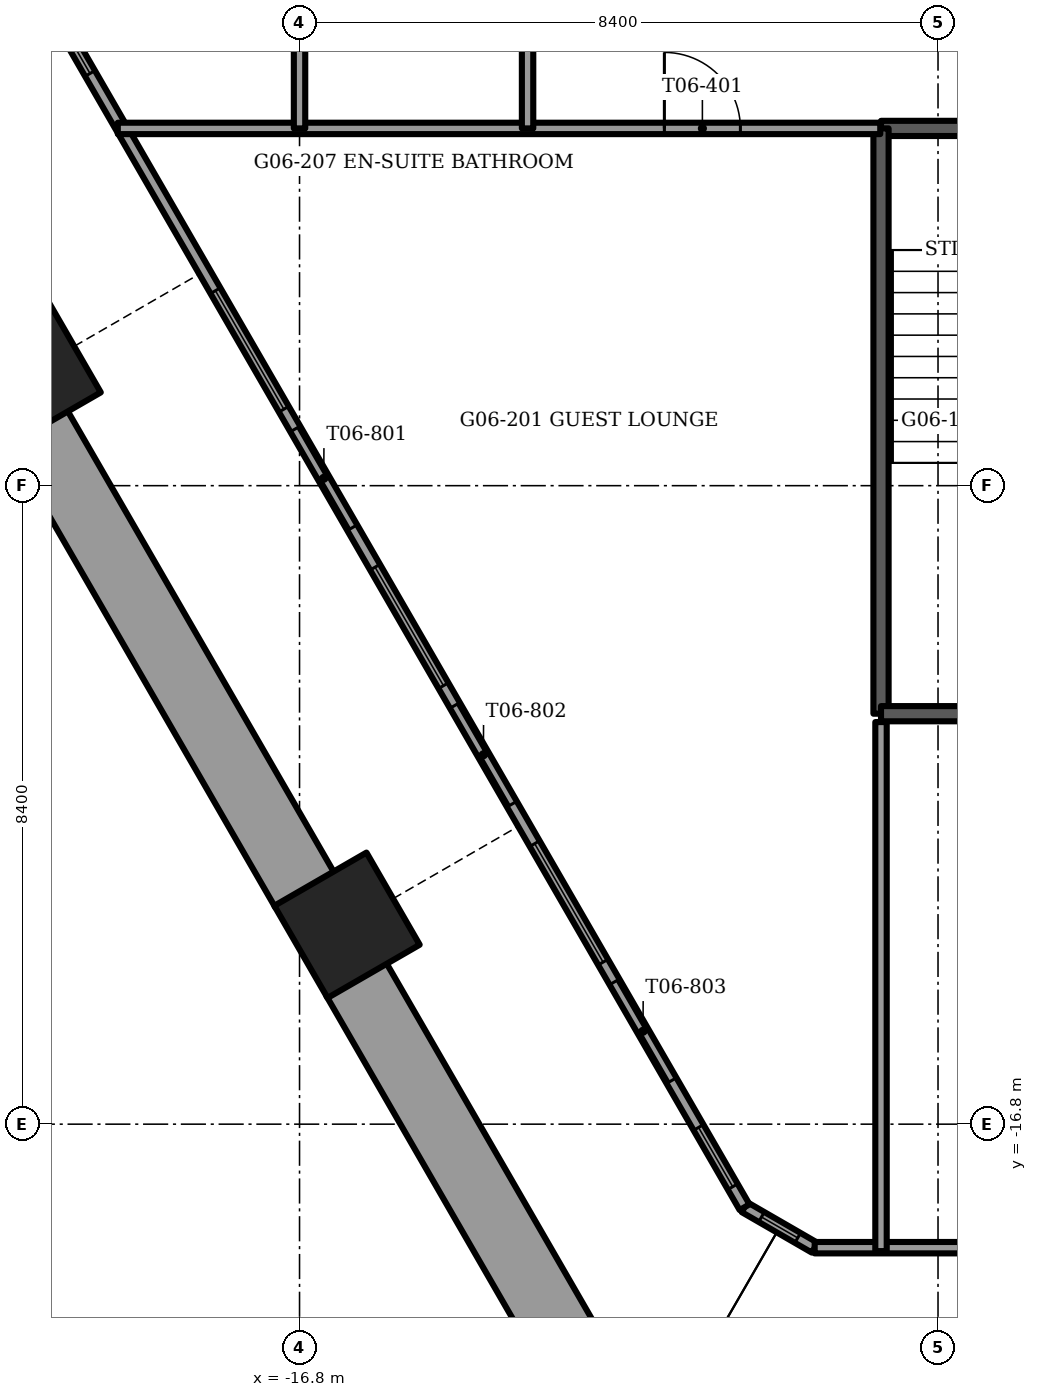
"""IFC4 building model, lengths in metres.
Left out: names, types, materials, properties, quantities, classifications, styles, units other than length and angle.
Written with IfcOpenShell. Run it as: python <this file> out.ifc"""

import sys

from ifc_helpers import new_model, si_unit, direction, frame, frame_2d, origin, origin_2d, place, context, subcontext, project, spatial, rectangle, extrude, element, fill, save


model = new_model("IFC4")
c1 = context("Model", 3, precision=1e-05, world=origin(), true_north=direction((0.0, 1.0)))
c2 = subcontext(c1, "Body", "Model", "MODEL_VIEW")
j1 = project(units=[si_unit("LENGTHUNIT", "METRE"), si_unit("PLANEANGLEUNIT", "RADIAN")], contexts=[c1])
p1 = place(None, origin())
s1 = spatial("IfcSite", under=j1, at=p1, CompositionType="ELEMENT")
p2 = place(p1, origin())
s2 = spatial("IfcBuilding", under=s1, at=p2, CompositionType="ELEMENT")
p3 = place(p2, frame((0.0, 0.0, 28.0)))
s3 = spatial("IfcBuildingStorey", under=s2, at=p3, CompositionType="ELEMENT", Elevation=28.0)
for number, where, z_axis, x_axis in (
    (1, (-20.371, -6.917, -1.2), (0.0, 0.0, 1.0), (-0.5, 0.866, 0.0)),
    (2, (-16.175, -14.183, -1.2), (0.0, 0.0, 1.0), (-0.5, 0.866, 0.0)),
):
    element("IfcColumn", number, at=place(p3, frame(where, z_axis=z_axis, x_axis=x_axis)), inside=s3, PredefinedType="COLUMN", context=c2, shape_type="SweptSolid", body=[
        extrude(rectangle(XDim=1.4, YDim=1.4, at=origin_2d()), origin(), (0.0, 0.0, 1.0), 3.75),
    ])
p4 = place(p3, frame((-20.252, -7.622, 0.0), z_axis=(0.0, 0.0, 1.0), x_axis=(0.499997206141, -0.866027016814, 0.0)))
e3 = element("IfcWall", 3, at=p4, inside=s3, PredefinedType="PARAPET", context=c2, shape_type="SweptSolid", body=[
    extrude(rectangle(XDim=7.051, YDim=0.9, at=frame_2d((3.525, 0.0))), origin(), (0.0, 0.0, 1.0), 1.1),
])
p5 = place(p3, frame((-16.057, -14.889, 0.0), z_axis=(0.0, 0.0, 1.0), x_axis=(0.500005133765, -0.866022439784, 0.0)))
e4 = element("IfcWall", 4, at=p5, inside=s3, PredefinedType="PARAPET", context=c2, shape_type="SweptSolid", body=[
    extrude(rectangle(XDim=6.704, YDim=0.9, at=frame_2d((3.352, 0.0))), origin(), (0.0, 0.0, 1.0), 1.1),
])
p6 = place(p3, frame((-20.968, -0.532, 0.0), z_axis=(0.0, 0.0, 1.0), x_axis=(0.500003237297, -0.866023534722, 0.0)))
e5 = element("IfcWall", 5, at=p6, inside=s3, PredefinedType="SOLIDWALL", context=c2, shape_type="SweptSolid", body=[
    extrude(rectangle(XDim=20.046, YDim=0.15, at=frame_2d((10.023, 0.0))), origin(), (0.0, 0.0, 1.0), 3.45),
])
p7 = place(p6, frame((1.923, 0.0, 0.15)))
e6 = element("IfcOpeningElement", 6, at=p7, cuts=e5, PredefinedType="OPENING", context=c2, shape_type="SweptSolid", body=[
    extrude(rectangle(XDim=0.9, YDim=2.85, at=frame_2d((0.45, 1.425))), frame((0.0, 0.075, 0.0), z_axis=(0.0, -1.0, 0.0), x_axis=(1.0, 0.0, 0.0)), (0.0, 0.0, 1.0), 0.15),
])
p8 = place(p6, frame((6.123, 0.0, 0.15)))
e7 = element("IfcOpeningElement", 7, at=p8, cuts=e5, PredefinedType="OPENING", context=c2, shape_type="SweptSolid", body=[
    extrude(rectangle(XDim=1.8, YDim=2.85, at=frame_2d((0.9, 1.425))), frame((0.0, 0.075, 0.0), z_axis=(0.0, -1.0, 0.0), x_axis=(1.0, 0.0, 0.0)), (0.0, 0.0, 1.0), 0.15),
])
p9 = place(p6, frame((8.223, 0.0, 0.0)))
e8 = element("IfcOpeningElement", 8, at=p9, cuts=e5, PredefinedType="OPENING", context=c2, shape_type="SweptSolid", body=[
    extrude(rectangle(XDim=1.5, YDim=2.4, at=frame_2d((0.75, 1.2))), frame((0.0, 0.075, 0.0), z_axis=(0.0, -1.0, 0.0), x_axis=(1.0, 0.0, 0.0)), (0.0, 0.0, 1.0), 0.15),
])
p10 = place(p6, frame((10.323, 0.0, 0.15)))
e9 = element("IfcOpeningElement", 9, at=p10, cuts=e5, PredefinedType="OPENING", context=c2, shape_type="SweptSolid", body=[
    extrude(rectangle(XDim=1.8, YDim=2.85, at=frame_2d((0.9, 1.425))), frame((0.0, 0.075, 0.0), z_axis=(0.0, -1.0, 0.0), x_axis=(1.0, 0.0, 0.0)), (0.0, 0.0, 1.0), 0.15),
])
p11 = place(p6, frame((12.423, 0.0, 0.0)))
e10 = element("IfcOpeningElement", 10, at=p11, cuts=e5, PredefinedType="OPENING", context=c2, shape_type="SweptSolid", body=[
    extrude(rectangle(XDim=1.5, YDim=2.4, at=frame_2d((0.75, 1.2))), frame((0.0, 0.075, 0.0), z_axis=(0.0, -1.0, 0.0), x_axis=(1.0, 0.0, 0.0)), (0.0, 0.0, 1.0), 0.15),
])
p12 = place(p6, frame((14.523, 0.0, 0.15)))
e11 = element("IfcOpeningElement", 11, at=p12, cuts=e5, PredefinedType="OPENING", context=c2, shape_type="SweptSolid", body=[
    extrude(rectangle(XDim=1.8, YDim=2.85, at=frame_2d((0.9, 1.425))), frame((0.0, 0.075, 0.0), z_axis=(0.0, -1.0, 0.0), x_axis=(1.0, 0.0, 0.0)), (0.0, 0.0, 1.0), 0.15),
])
p13 = place(p6, frame((16.623, 0.0, 0.0)))
e12 = element("IfcOpeningElement", 12, at=p13, cuts=e5, PredefinedType="OPENING", context=c2, shape_type="SweptSolid", body=[
    extrude(rectangle(XDim=1.5, YDim=2.4, at=frame_2d((0.75, 1.2))), frame((0.0, 0.075, 0.0), z_axis=(0.0, -1.0, 0.0), x_axis=(1.0, 0.0, 0.0)), (0.0, 0.0, 1.0), 0.15),
])
p14 = place(p6, frame((0.311, 0.0, 0.15)))
e13 = element("IfcOpeningElement", 13, at=p14, cuts=e5, PredefinedType="OPENING", context=c2, shape_type="SweptSolid", body=[
    extrude(rectangle(XDim=0.9, YDim=2.73, at=frame_2d((0.45, 1.365))), frame((0.0, 0.075, 0.0), z_axis=(0.0, -1.0, 0.0), x_axis=(1.0, 0.0, 0.0)), (0.0, 0.0, 1.0), 0.15),
])
p15 = place(p6, frame((18.834, 0.0, 0.15)))
e14 = element("IfcOpeningElement", 14, at=p15, cuts=e5, PredefinedType="OPENING", context=c2, shape_type="SweptSolid", body=[
    extrude(rectangle(XDim=0.9, YDim=2.73, at=frame_2d((0.45, 1.365))), frame((0.0, 0.075, 0.0), z_axis=(0.0, -1.0, 0.0), x_axis=(1.0, 0.0, 0.0)), (0.0, 0.0, 1.0), 0.15),
])
p16 = place(p3, frame((-10.023, -18.425, 0.0), z_axis=(0.0, 0.0, 1.0), x_axis=(1.0, 0.0, 0.0)))
e15 = element("IfcWall", 15, at=p16, inside=s3, PredefinedType="SOLIDWALL", context=c2, shape_type="SweptSolid", body=[
    extrude(rectangle(XDim=20.045, YDim=0.15, at=frame_2d((10.023, 0.0))), origin(), (0.0, 0.0, 1.0), 3.45),
])
p17 = place(p16, frame((4.573, 0.0, 0.15)))
e16 = element("IfcOpeningElement", 16, at=p17, cuts=e15, PredefinedType="OPENING", context=c2, shape_type="SweptSolid", body=[
    extrude(rectangle(XDim=0.9, YDim=2.85, at=frame_2d((0.45, 1.425))), frame((0.0, 0.075, 0.0), z_axis=(0.0, -1.0, 0.0), x_axis=(1.0, 0.0, 0.0)), (0.0, 0.0, 1.0), 0.15),
])
p18 = place(p16, frame((2.373, 0.0, 0.15)))
e17 = element("IfcOpeningElement", 17, at=p18, cuts=e15, PredefinedType="OPENING", context=c2, shape_type="SweptSolid", body=[
    extrude(rectangle(XDim=1.5, YDim=2.85, at=frame_2d((0.75, 1.425))), frame((0.0, 0.075, 0.0), z_axis=(0.0, -1.0, 0.0), x_axis=(1.0, 0.0, 0.0)), (0.0, 0.0, 1.0), 0.15),
])
p19 = place(p16, frame((6.123, 0.0, 0.15)))
e18 = element("IfcOpeningElement", 18, at=p19, cuts=e15, PredefinedType="OPENING", context=c2, shape_type="SweptSolid", body=[
    extrude(rectangle(XDim=1.8, YDim=2.85, at=frame_2d((0.9, 1.425))), frame((0.0, 0.075, 0.0), z_axis=(0.0, -1.0, 0.0), x_axis=(1.0, 0.0, 0.0)), (0.0, 0.0, 1.0), 0.15),
])
p20 = place(p16, frame((8.173, 0.0, 0.15)))
e19 = element("IfcOpeningElement", 19, at=p20, cuts=e15, PredefinedType="OPENING", context=c2, shape_type="SweptSolid", body=[
    extrude(rectangle(XDim=1.5, YDim=2.85, at=frame_2d((0.75, 1.425))), frame((0.0, 0.075, 0.0), z_axis=(0.0, -1.0, 0.0), x_axis=(1.0, 0.0, 0.0)), (0.0, 0.0, 1.0), 0.15),
])
p21 = place(p16, frame((10.373, 0.0, 0.15)))
e20 = element("IfcOpeningElement", 20, at=p21, cuts=e15, PredefinedType="OPENING", context=c2, shape_type="SweptSolid", body=[
    extrude(rectangle(XDim=1.8, YDim=2.85, at=frame_2d((0.9, 1.425))), frame((0.0, 0.075, 0.0), z_axis=(0.0, -1.0, 0.0), x_axis=(1.0, 0.0, 0.0)), (0.0, 0.0, 1.0), 0.15),
])
p22 = place(p16, frame((12.423, 0.0, 0.0)))
e21 = element("IfcOpeningElement", 21, at=p22, cuts=e15, PredefinedType="OPENING", context=c2, shape_type="SweptSolid", body=[
    extrude(rectangle(XDim=1.5, YDim=2.4, at=frame_2d((0.75, 1.2))), frame((0.0, 0.075, 0.0), z_axis=(0.0, -1.0, 0.0), x_axis=(1.0, 0.0, 0.0)), (0.0, 0.0, 1.0), 0.15),
])
p23 = place(p16, frame((16.173, 0.0, 0.15)))
e22 = element("IfcOpeningElement", 22, at=p23, cuts=e15, PredefinedType="OPENING", context=c2, shape_type="SweptSolid", body=[
    extrude(rectangle(XDim=1.8, YDim=2.85, at=frame_2d((0.9, 1.425))), frame((0.0, 0.075, 0.0), z_axis=(0.0, -1.0, 0.0), x_axis=(1.0, 0.0, 0.0)), (0.0, 0.0, 1.0), 0.15),
])
p24 = place(p3, frame((-10.945, -17.893, 0.0), z_axis=(0.0, 0.0, 1.0), x_axis=(0.866048165231, -0.499960573946, 0.0)))
e23 = element("IfcWall", 23, at=p24, inside=s3, PredefinedType="SOLIDWALL", context=c2, shape_type="SweptSolid", body=[
    extrude(rectangle(XDim=1.065, YDim=0.15, at=frame_2d((0.532, 0.0))), origin(), (0.0, 0.0, 1.0), 3.45),
])
p25 = place(p24, frame((0.258, 0.0, 0.15)))
e24 = element("IfcOpeningElement", 24, at=p25, cuts=e23, PredefinedType="OPENING", context=c2, shape_type="SweptSolid", body=[
    extrude(rectangle(XDim=0.55, YDim=2.85, at=frame_2d((0.275, 1.425))), frame((0.0, 0.075, 0.0), z_axis=(0.0, -1.0, 0.0), x_axis=(1.0, 0.0, 0.0)), (0.0, 0.0, 1.0), 0.15),
])
p26 = place(p3, frame((-9.15, -3.7, -0.3), z_axis=(0.0, 0.0, 1.0), x_axis=(1.0, 0.0, 0.0)))
e25 = element("IfcWall", 25, at=p26, inside=s3, PredefinedType="SOLIDWALL", context=c2, shape_type="SweptSolid", body=[
    extrude(rectangle(XDim=3.35, YDim=0.2, at=frame_2d((1.675, 0.0))), origin(), (0.0, 0.0, 1.0), 3.75),
])
p27 = place(p26, frame((1.125, 0.0, 0.0)))
e26 = element("IfcOpeningElement", 26, at=p27, cuts=e25, PredefinedType="OPENING", context=c2, shape_type="SweptSolid", body=[
    extrude(rectangle(XDim=1.1, YDim=2.1, at=frame_2d((0.55, 1.05))), frame((0.0, 0.1, 0.0), z_axis=(0.0, -1.0, 0.0), x_axis=(1.0, 0.0, 0.0)), (0.0, 0.0, 1.0), 0.2),
])
p28 = place(p3, frame((-9.15, -3.7, -0.3), z_axis=(0.0, 0.0, 1.0), x_axis=(0.0, -1.0, 0.0)))
e27 = element("IfcWall", 27, at=p28, inside=s3, PredefinedType="SOLIDWALL", context=c2, shape_type="SweptSolid", body=[
    extrude(rectangle(XDim=7.7, YDim=0.2, at=frame_2d((3.85, 0.0))), origin(), (0.0, 0.0, 1.0), 3.75),
])
p29 = place(p3, frame((-9.15, -11.4, -0.3), z_axis=(0.0, 0.0, 1.0), x_axis=(1.0, 0.0, 0.0)))
e28 = element("IfcWall", 28, at=p29, inside=s3, PredefinedType="SOLIDWALL", context=c2, shape_type="SweptSolid", body=[
    extrude(rectangle(XDim=3.35, YDim=0.2, at=frame_2d((1.675, 0.0))), origin(), (0.0, 0.0, 1.0), 3.75),
])
p30 = place(p3, frame((-19.191, -3.7, 0.0), z_axis=(0.0, 0.0, 1.0), x_axis=(1.0, 0.0, 0.0)))
e29 = element("IfcWall", 29, at=p30, inside=s3, PredefinedType="PARTITIONING", context=c2, shape_type="SweptSolid", body=[
    extrude(rectangle(XDim=10.031, YDim=0.15, at=frame_2d((5.016, 0.0))), origin(), (0.0, 0.0, 1.0), 3.45),
])
p31 = place(p30, frame((7.191, 0.0, 0.0)))
e30 = element("IfcOpeningElement", 30, at=p31, cuts=e29, PredefinedType="OPENING", context=c2, shape_type="SweptSolid", body=[
    extrude(rectangle(XDim=1.0, YDim=2.1, at=frame_2d((0.5, 1.05))), frame((0.0, 0.075, 0.0), z_axis=(0.0, -1.0, 0.0), x_axis=(1.0, 0.0, 0.0)), (0.0, 0.0, 1.0), 0.15),
])
p32 = place(p3, frame((-9.15, -18.47, 0.0), z_axis=(0.0, 0.0, 1.0), x_axis=(0.0, 1.0, 0.0)))
e31 = element("IfcWall", 31, at=p32, inside=s3, PredefinedType="PARTITIONING", context=c2, shape_type="SweptSolid", body=[
    extrude(rectangle(XDim=6.96, YDim=0.15, at=frame_2d((3.48, 0.0))), origin(), (0.0, 0.0, 1.0), 3.45),
])
p33 = place(p3, frame((-13.8, -3.7, 0.0), z_axis=(0.0, 0.0, 1.0), x_axis=(0.0, 1.0, 0.0)))
e32 = element("IfcWall", 32, at=p33, inside=s3, PredefinedType="PARTITIONING", context=c2, shape_type="SweptSolid", body=[
    extrude(rectangle(XDim=16.738, YDim=0.15, at=frame_2d((8.369, 0.0))), origin(), (0.0, 0.0, 1.0), 3.45),
])
p34 = place(p33, frame((5.8, 0.0, 0.0)))
e33 = element("IfcOpeningElement", 33, at=p34, cuts=e32, PredefinedType="OPENING", context=c2, shape_type="SweptSolid", body=[
    extrude(rectangle(XDim=1.0, YDim=2.1, at=frame_2d((0.5, 1.05))), frame((0.0, 0.075, 0.0), z_axis=(0.0, -1.0, 0.0), x_axis=(1.0, 0.0, 0.0)), (0.0, 0.0, 1.0), 0.15),
])
p35 = place(p33, frame((11.948, 0.0, 0.0)))
e34 = element("IfcOpeningElement", 34, at=p35, cuts=e32, PredefinedType="OPENING", context=c2, shape_type="SweptSolid", body=[
    extrude(rectangle(XDim=1.0, YDim=2.1, at=frame_2d((0.5, 1.05))), frame((0.0, 0.075, 0.0), z_axis=(0.0, -1.0, 0.0), x_axis=(1.0, 0.0, 0.0)), (0.0, 0.0, 1.0), 0.15),
])
p36 = place(p3, frame((-16.8, -3.7, 0.0), z_axis=(0.0, 0.0, 1.0), x_axis=(0.0, 1.0, 0.0)))
e35 = element("IfcWall", 35, at=p36, inside=s3, PredefinedType="PARTITIONING", context=c2, shape_type="SweptSolid", body=[
    extrude(rectangle(XDim=2.8, YDim=0.15, at=frame_2d((1.4, 0.0))), origin(), (0.0, 0.0, 1.0), 3.45),
])
p37 = place(p7, origin())
e36 = element("IfcWindow", 36, at=p37, inside=s3, PartitioningType="SINGLE_PANEL", PredefinedType="WINDOW", context=c2, shape_type="SweptSolid", body=[
    extrude(rectangle(XDim=0.9, YDim=2.85, at=frame_2d((0.45, 1.425))), frame((0.0, 0.03, 0.0), z_axis=(0.0, -1.0, 0.0), x_axis=(1.0, 0.0, 0.0)), (0.0, 0.0, 1.0), 0.06),
])
fill(e6, e36)
p38 = place(p8, origin())
e37 = element("IfcWindow", 37, at=p38, inside=s3, PartitioningType="SINGLE_PANEL", PredefinedType="WINDOW", context=c2, shape_type="SweptSolid", body=[
    extrude(rectangle(XDim=1.8, YDim=2.85, at=frame_2d((0.9, 1.425))), frame((0.0, 0.03, 0.0), z_axis=(0.0, -1.0, 0.0), x_axis=(1.0, 0.0, 0.0)), (0.0, 0.0, 1.0), 0.06),
])
fill(e7, e37)
p39 = place(p9, origin())
e38 = element("IfcDoor", 38, at=p39, inside=s3, OperationType="SLIDING_TO_RIGHT", PredefinedType="DOOR", context=c2, shape_type="SweptSolid", body=[
    extrude(rectangle(XDim=1.5, YDim=2.4, at=frame_2d((0.75, 1.2))), frame((0.0, 0.025, 0.0), z_axis=(0.0, -1.0, 0.0), x_axis=(1.0, 0.0, 0.0)), (0.0, 0.0, 1.0), 0.05),
])
fill(e8, e38)
p40 = place(p10, origin())
e39 = element("IfcWindow", 39, at=p40, inside=s3, PartitioningType="SINGLE_PANEL", PredefinedType="WINDOW", context=c2, shape_type="SweptSolid", body=[
    extrude(rectangle(XDim=1.8, YDim=2.85, at=frame_2d((0.9, 1.425))), frame((0.0, 0.03, 0.0), z_axis=(0.0, -1.0, 0.0), x_axis=(1.0, 0.0, 0.0)), (0.0, 0.0, 1.0), 0.06),
])
fill(e9, e39)
p41 = place(p11, origin())
e40 = element("IfcDoor", 40, at=p41, inside=s3, OperationType="SLIDING_TO_LEFT", PredefinedType="DOOR", context=c2, shape_type="SweptSolid", body=[
    extrude(rectangle(XDim=1.5, YDim=2.4, at=frame_2d((0.75, 1.2))), frame((0.0, 0.025, 0.0), z_axis=(0.0, -1.0, 0.0), x_axis=(1.0, 0.0, 0.0)), (0.0, 0.0, 1.0), 0.05),
])
fill(e10, e40)
p42 = place(p12, origin())
e41 = element("IfcWindow", 41, at=p42, inside=s3, PartitioningType="SINGLE_PANEL", PredefinedType="WINDOW", context=c2, shape_type="SweptSolid", body=[
    extrude(rectangle(XDim=1.8, YDim=2.85, at=frame_2d((0.9, 1.425))), frame((0.0, 0.03, 0.0), z_axis=(0.0, -1.0, 0.0), x_axis=(1.0, 0.0, 0.0)), (0.0, 0.0, 1.0), 0.06),
])
fill(e11, e41)
p43 = place(p13, origin())
e42 = element("IfcDoor", 42, at=p43, inside=s3, OperationType="SLIDING_TO_RIGHT", PredefinedType="DOOR", context=c2, shape_type="SweptSolid", body=[
    extrude(rectangle(XDim=1.5, YDim=2.4, at=frame_2d((0.75, 1.2))), frame((0.0, 0.025, 0.0), z_axis=(0.0, -1.0, 0.0), x_axis=(1.0, 0.0, 0.0)), (0.0, 0.0, 1.0), 0.05),
])
fill(e12, e42)
p44 = place(p15, origin())
e43 = element("IfcWindow", 43, at=p44, inside=s3, PartitioningType="SINGLE_PANEL", PredefinedType="WINDOW", context=c2, shape_type="SweptSolid", body=[
    extrude(rectangle(XDim=0.9, YDim=2.73, at=frame_2d((0.45, 1.365))), frame((0.0, 0.03, 0.0), z_axis=(0.0, -1.0, 0.0), x_axis=(1.0, 0.0, 0.0)), (0.0, 0.0, 1.0), 0.06),
])
fill(e14, e43)
p45 = place(p25, origin())
e44 = element("IfcWindow", 44, at=p45, inside=s3, PartitioningType="SINGLE_PANEL", PredefinedType="WINDOW", context=c2, shape_type="SweptSolid", body=[
    extrude(rectangle(XDim=0.55, YDim=2.85, at=frame_2d((0.275, 1.425))), frame((0.0, 0.03, 0.0), z_axis=(0.0, -1.0, 0.0), x_axis=(1.0, 0.0, 0.0)), (0.0, 0.0, 1.0), 0.06),
])
fill(e24, e44)
p46 = place(p31, origin())
e45 = element("IfcDoor", 45, at=p46, inside=s3, OperationType="SINGLE_SWING_RIGHT", PredefinedType="DOOR", context=c2, shape_type="SweptSolid", body=[
    extrude(rectangle(XDim=1.0, YDim=2.1, at=frame_2d((0.5, 1.05))), frame((0.0, 0.025, 0.0), z_axis=(0.0, -1.0, 0.0), x_axis=(1.0, 0.0, 0.0)), (0.0, 0.0, 1.0), 0.05),
])
fill(e30, e45)
save(model, sys.argv[1])
